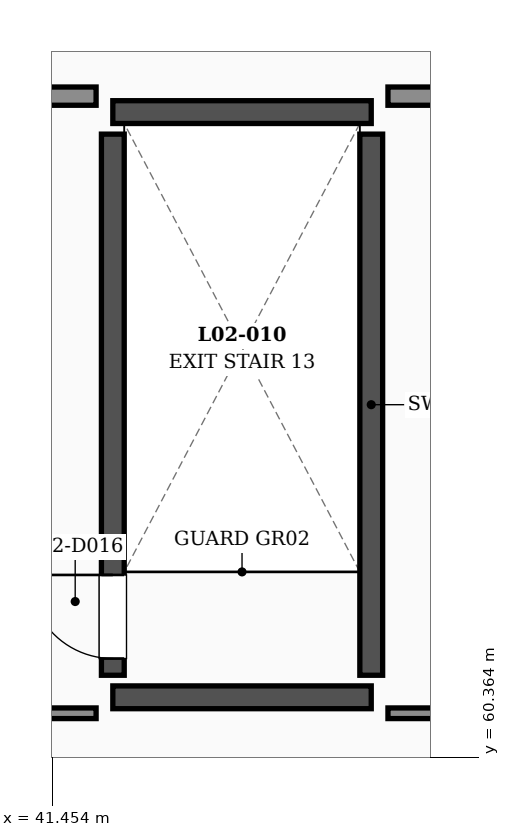
"""IFC4 building model, lengths in metres.
Left out: names, types, materials, properties, quantities, classifications, styles, units other than length and angle.
Written with IfcOpenShell. Run it as: python <this file> out.ifc"""

import sys

from ifc_helpers import new_model, si_unit, direction, frame, frame_2d, origin, place, context, subcontext, project, spatial, rectangle, extrude, element, fill, save


model = new_model("IFC4")
c1 = context("Model", 3, precision=1e-05, world=origin(), true_north=direction((0.0, 1.0)))
c2 = subcontext(c1, "Body", "Model", "MODEL_VIEW")
j1 = project(units=[si_unit("LENGTHUNIT", "METRE"), si_unit("PLANEANGLEUNIT", "RADIAN")], contexts=[c1])
p1 = place(None, origin())
s1 = spatial("IfcSite", under=j1, at=p1, CompositionType="ELEMENT")
p2 = place(p1, origin())
s2 = spatial("IfcBuilding", under=s1, at=p2, CompositionType="ELEMENT")
p3 = place(p2, frame((0.0, 0.0, 10.8)))
s3 = spatial("IfcBuildingStorey", under=s2, at=p3, CompositionType="ELEMENT", Elevation=10.8)
for number, where, z_axis, x_axis in (
    (1, (42.25, 61.15, 0.0), (0.0, 0.0, 1.0), (1.0, 0.0, 0.0)),
    (2, (42.25, 68.85, 0.0), (0.0, 0.0, 1.0), (1.0, 0.0, 0.0)),
):
    element("IfcWall", number, at=place(p3, frame(where, z_axis=z_axis, x_axis=x_axis)), inside=s3, PredefinedType="SHEAR", context=c2, shape_type="SweptSolid", body=[
        extrude(rectangle(XDim=3.4, YDim=0.3, at=frame_2d((1.7, 0.0))), origin(), (0.0, 0.0, 1.0), 3.98),
    ])
p4 = place(p3, frame((42.25, 61.44, 0.0), z_axis=(0.0, 0.0, 1.0), x_axis=(0.0, 1.0, 0.0)))
e3 = element("IfcWall", 3, at=p4, inside=s3, PredefinedType="SHEAR", context=c2, shape_type="SweptSolid", body=[
    extrude(rectangle(XDim=7.12, YDim=0.3, at=frame_2d((3.56, 0.0))), origin(), (0.0, 0.0, 1.0), 3.98),
])
p5 = place(p4, frame((0.22, 0.0, 0.0)))
e4 = element("IfcOpeningElement", 4, at=p5, cuts=e3, PredefinedType="OPENING", context=c2, shape_type="SweptSolid", body=[
    extrude(rectangle(XDim=1.1, YDim=2.2, at=frame_2d((0.55, 1.1))), frame((0.0, 0.16, 0.0), z_axis=(0.0, -1.0, 0.0), x_axis=(1.0, 0.0, 0.0)), (0.0, 0.0, 1.0), 0.32),
])
p6 = place(p3, frame((45.65, 61.44, 0.0), z_axis=(0.0, 0.0, 1.0), x_axis=(0.0, 1.0, 0.0)))
e5 = element("IfcWall", 5, at=p6, inside=s3, PredefinedType="SHEAR", context=c2, shape_type="SweptSolid", body=[
    extrude(rectangle(XDim=7.12, YDim=0.3, at=frame_2d((3.56, 0.0))), origin(), (0.0, 0.0, 1.0), 3.98),
])
p7 = place(p3, frame((34.68, 60.94, 0.0), z_axis=(0.0, 0.0, 1.0), x_axis=(1.0, 0.0, 0.0)))
e6 = element("IfcWall", 6, at=p7, inside=s3, PredefinedType="PARTITIONING", context=c2, shape_type="SweptSolid", body=[
    extrude(rectangle(XDim=7.35, YDim=0.14, at=frame_2d((3.675, 0.0))), origin(), (0.0, 0.0, 1.0), 3.92),
])
p8 = place(p3, frame((45.87, 60.94, 0.0), z_axis=(0.0, 0.0, 1.0), x_axis=(1.0, 0.0, 0.0)))
e7 = element("IfcWall", 7, at=p8, inside=s3, PredefinedType="PARTITIONING", context=c2, shape_type="SweptSolid", body=[
    extrude(rectangle(XDim=2.46, YDim=0.14, at=frame_2d((1.23, 0.0))), origin(), (0.0, 0.0, 1.0), 3.92),
])
p9 = place(p3, frame((48.33, 69.06, 0.0), z_axis=(0.0, 0.0, 1.0), x_axis=(-1.0, 0.0, 0.0)))
e8 = element("IfcWall", 8, at=p9, inside=s3, PredefinedType="PARTITIONING", context=c2, shape_type="SweptSolid", body=[
    extrude(rectangle(XDim=2.46, YDim=0.24, at=frame_2d((1.23, 0.0))), origin(), (0.0, 0.0, 1.0), 3.48),
])
p10 = place(p3, frame((42.03, 69.06, 0.0), z_axis=(0.0, 0.0, 1.0), x_axis=(-1.0, 0.0, 0.0)))
e9 = element("IfcWall", 9, at=p10, inside=s3, PredefinedType="PARTITIONING", context=c2, shape_type="SweptSolid", body=[
    extrude(rectangle(XDim=7.35, YDim=0.24, at=frame_2d((3.675, 0.0))), origin(), (0.0, 0.0, 1.0), 3.23),
])
p11 = place(p5, origin())
e10 = element("IfcDoor", 10, at=p11, inside=s3, OperationType="SINGLE_SWING_RIGHT", PredefinedType="DOOR", context=c2, shape_type="SweptSolid", body=[
    extrude(rectangle(XDim=1.1, YDim=2.2, at=frame_2d((0.55, 1.1))), frame((0.0, 0.025, 0.0), z_axis=(0.0, -1.0, 0.0), x_axis=(1.0, 0.0, 0.0)), (0.0, 0.0, 1.0), 0.05),
])
fill(e4, e10)
save(model, sys.argv[1])
